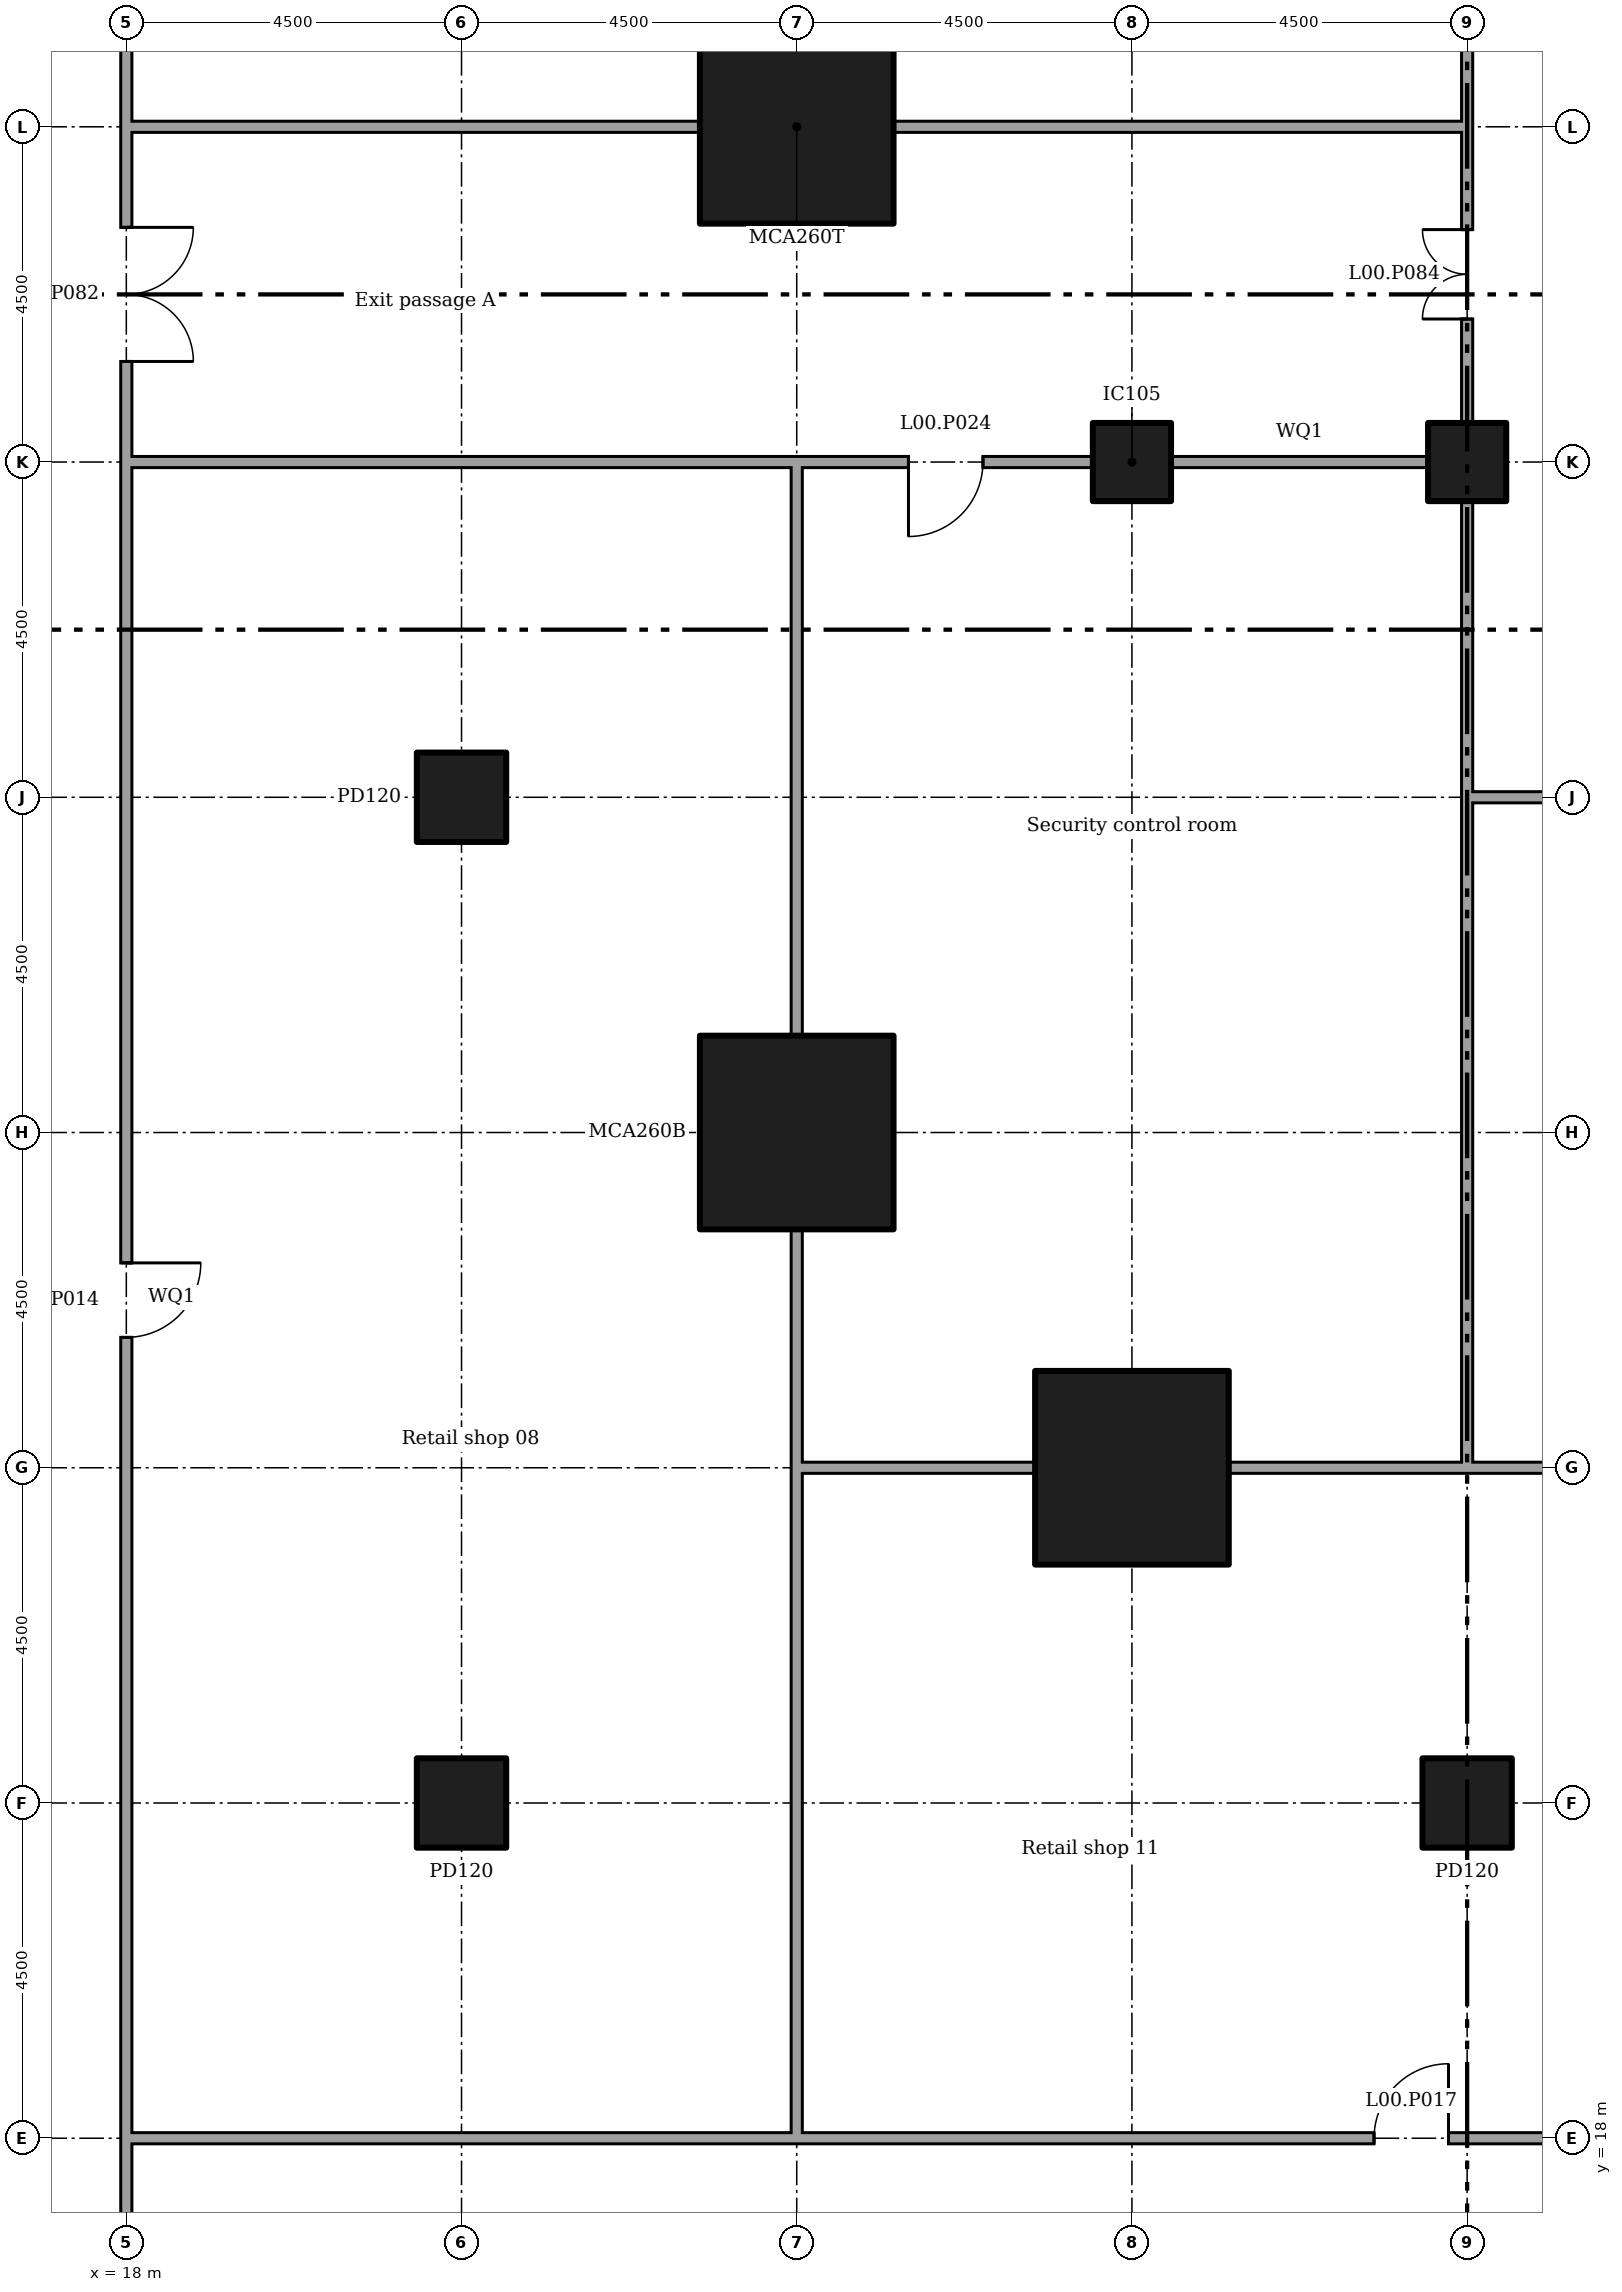
"""IFC4 building model, lengths in metres.
Left out: names, types, materials, properties, quantities, classifications, styles, units other than length and angle.
Written with IfcOpenShell. Run it as: python <this file> out.ifc"""

import sys

from ifc_helpers import new_model, si_unit, direction, frame, frame_2d, origin, origin_2d, place, context, subcontext, project, spatial, rectangle, extrude, element, fill, save


model = new_model("IFC4")
c1 = context("Model", 3, precision=1e-05, world=origin(), true_north=direction((0.0, 1.0)))
c2 = subcontext(c1, "Body", "Model", "MODEL_VIEW")
j1 = project(units=[si_unit("LENGTHUNIT", "METRE"), si_unit("PLANEANGLEUNIT", "RADIAN")], contexts=[c1])
p1 = place(None, origin())
s1 = spatial("IfcSite", under=j1, at=p1, CompositionType="ELEMENT")
p2 = place(p1, origin())
s2 = spatial("IfcBuilding", under=s1, at=p2, CompositionType="ELEMENT")
p3 = place(p2, origin())
s3 = spatial("IfcBuildingStorey", under=s2, at=p3, CompositionType="ELEMENT", Elevation=0.0)
for number, where in (
    (1, (27.0, 31.5, 0.0)),
    (2, (27.0, 45.0, 0.0)),
    (3, (31.5, 27.0, 0.0)),
):
    element("IfcColumn", number, at=place(p3, frame(where)), inside=s3, PredefinedType="COLUMN", context=c2, shape_type="SweptSolid", body=[
        extrude(rectangle(XDim=2.6, YDim=2.6, at=origin_2d()), origin(), (0.0, 0.0, 1.0), 6.0),
    ])
for number, where in (
    (4, (31.5, 40.5, 0.0)),
    (5, (36.0, 40.5, 0.0)),
):
    element("IfcColumn", number, at=place(p3, frame(where)), inside=s3, PredefinedType="COLUMN", context=c2, shape_type="SweptSolid", body=[
        extrude(rectangle(XDim=1.05, YDim=1.05, at=origin_2d()), origin(), (0.0, 0.0, 1.0), 6.0),
    ])
for number, where in (
    (6, (22.5, 22.5, 0.0)),
    (7, (22.5, 36.0, 0.0)),
    (8, (36.0, 22.5, 0.0)),
):
    element("IfcColumn", number, at=place(p3, frame(where)), inside=s3, PredefinedType="COLUMN", context=c2, shape_type="SweptSolid", body=[
        extrude(rectangle(XDim=1.2, YDim=1.2, at=origin_2d()), origin(), (0.0, 0.0, 1.0), 6.0),
    ])
p4 = place(p3, frame((18.0, 9.075, 0.0), z_axis=(0.0, 0.0, 1.0), x_axis=(0.0, 1.0, 0.0)))
e9 = element("IfcWall", 9, at=p4, inside=s3, PredefinedType="PARTITIONING", context=c2, shape_type="SweptSolid", body=[
    extrude(rectangle(XDim=9.0, YDim=0.15, at=frame_2d((4.5, 0.0))), origin(), (0.0, 0.0, 1.0), 5.55),
])
p5 = place(p4, frame((3.525, 0.0, 0.0)))
e10 = element("IfcOpeningElement", 10, at=p5, cuts=e9, PredefinedType="OPENING", context=c2, shape_type="SweptSolid", body=[
    extrude(rectangle(XDim=1.8, YDim=2.1, at=frame_2d((0.9, 1.05))), frame((0.0, 0.085, 0.0), z_axis=(0.0, -1.0, 0.0), x_axis=(1.0, 0.0, 0.0)), (0.0, 0.0, 1.0), 0.17),
])
p6 = place(p3, frame((18.075, 18.0, 0.0)))
e11 = element("IfcWall", 11, at=p6, inside=s3, PredefinedType="PARTITIONING", context=c2, shape_type="SweptSolid", body=[
    extrude(rectangle(XDim=9.0, YDim=0.15, at=frame_2d((4.5, 0.0))), origin(), (0.0, 0.0, 1.0), 5.55),
])
p7 = place(p3, frame((27.0, 18.0, 0.0)))
e12 = element("IfcWall", 12, at=p7, inside=s3, PredefinedType="PARTITIONING", context=c2, shape_type="SweptSolid", body=[
    extrude(rectangle(XDim=16.575, YDim=0.15, at=frame_2d((8.288, 0.0))), origin(), (0.0, 0.0, 1.0), 5.55),
])
p8 = place(p7, frame((7.75, 0.0, 0.0)))
e13 = element("IfcOpeningElement", 13, at=p8, cuts=e12, PredefinedType="OPENING", context=c2, shape_type="SweptSolid", body=[
    extrude(rectangle(XDim=1.0, YDim=2.1, at=frame_2d((0.5, 1.05))), frame((0.0, 0.085, 0.0), z_axis=(0.0, -1.0, 0.0), x_axis=(1.0, 0.0, 0.0)), (0.0, 0.0, 1.0), 0.17),
])
p9 = place(p3, frame((18.0, 18.0, 0.0), z_axis=(0.0, 0.0, 1.0), x_axis=(0.0, 1.0, 0.0)))
e14 = element("IfcWall", 14, at=p9, inside=s3, PredefinedType="PARTITIONING", context=c2, shape_type="SweptSolid", body=[
    extrude(rectangle(XDim=22.575, YDim=0.15, at=frame_2d((11.288, 0.0))), origin(), (0.0, 0.0, 1.0), 5.55),
])
p10 = place(p9, frame((10.75, 0.0, 0.0)))
e15 = element("IfcOpeningElement", 15, at=p10, cuts=e14, PredefinedType="OPENING", context=c2, shape_type="SweptSolid", body=[
    extrude(rectangle(XDim=1.0, YDim=2.1, at=frame_2d((0.5, 1.05))), frame((0.0, 0.085, 0.0), z_axis=(0.0, -1.0, 0.0), x_axis=(1.0, 0.0, 0.0)), (0.0, 0.0, 1.0), 0.17),
])
p11 = place(p3, frame((18.0, 40.5, 0.0), z_axis=(0.0, 0.0, 1.0), x_axis=(0.0, 1.0, 0.0)))
e16 = element("IfcWall", 16, at=p11, inside=s3, PredefinedType="PARTITIONING", context=c2, shape_type="SweptSolid", body=[
    extrude(rectangle(XDim=4.575, YDim=0.15, at=frame_2d((2.288, 0.0))), origin(), (0.0, 0.0, 1.0), 5.55),
])
p12 = place(p11, frame((1.35, 0.0, 0.0)))
e17 = element("IfcOpeningElement", 17, at=p12, cuts=e16, PredefinedType="OPENING", context=c2, shape_type="SweptSolid", body=[
    extrude(rectangle(XDim=1.8, YDim=2.1, at=frame_2d((0.9, 1.05))), frame((0.0, 0.085, 0.0), z_axis=(0.0, -1.0, 0.0), x_axis=(1.0, 0.0, 0.0)), (0.0, 0.0, 1.0), 0.17),
])
p13 = place(p3, frame((18.0, 45.0, 0.0), z_axis=(0.0, 0.0, 1.0), x_axis=(0.0, 1.0, 0.0)))
e18 = element("IfcWall", 18, at=p13, inside=s3, PredefinedType="PARTITIONING", context=c2, shape_type="SweptSolid", body=[
    extrude(rectangle(XDim=18.075, YDim=0.15, at=frame_2d((9.038, 0.0))), origin(), (0.0, 0.0, 1.0), 5.55),
])
p14 = place(p13, frame((8.5, 0.0, 0.0)))
e19 = element("IfcOpeningElement", 19, at=p14, cuts=e18, PredefinedType="OPENING", context=c2, shape_type="SweptSolid", body=[
    extrude(rectangle(XDim=1.0, YDim=2.1, at=frame_2d((0.5, 1.05))), frame((0.0, 0.085, 0.0), z_axis=(0.0, -1.0, 0.0), x_axis=(1.0, 0.0, 0.0)), (0.0, 0.0, 1.0), 0.17),
])
p15 = place(p3, frame((18.075, 40.5, 0.0)))
e20 = element("IfcWall", 20, at=p15, inside=s3, PredefinedType="PARTITIONING", context=c2, shape_type="SweptSolid", body=[
    extrude(rectangle(XDim=9.0, YDim=0.15, at=frame_2d((4.5, 0.0))), origin(), (0.0, 0.0, 1.0), 5.55),
])
p16 = place(p3, frame((27.0, 18.075, 0.0), z_axis=(0.0, 0.0, 1.0), x_axis=(0.0, 1.0, 0.0)))
e21 = element("IfcWall", 21, at=p16, inside=s3, PredefinedType="PARTITIONING", context=c2, shape_type="SweptSolid", body=[
    extrude(rectangle(XDim=9.0, YDim=0.15, at=frame_2d((4.5, 0.0))), origin(), (0.0, 0.0, 1.0), 5.55),
])
p17 = place(p3, frame((27.0, 27.0, 0.0), z_axis=(0.0, 0.0, 1.0), x_axis=(0.0, 1.0, 0.0)))
e22 = element("IfcWall", 22, at=p17, inside=s3, PredefinedType="PARTITIONING", context=c2, shape_type="SweptSolid", body=[
    extrude(rectangle(XDim=3.205, YDim=0.15, at=frame_2d((1.603, 0.0))), origin(), (0.0, 0.0, 1.0), 5.55),
])
p18 = place(p3, frame((27.0, 32.795, 0.0), z_axis=(0.0, 0.0, 1.0), x_axis=(0.0, 1.0, 0.0)))
e23 = element("IfcWall", 23, at=p18, inside=s3, PredefinedType="PARTITIONING", context=c2, shape_type="SweptSolid", body=[
    extrude(rectangle(XDim=7.63, YDim=0.15, at=frame_2d((3.815, 0.0))), origin(), (0.0, 0.0, 1.0), 5.55),
])
p19 = place(p3, frame((18.075, 45.0, 0.0)))
e24 = element("IfcWall", 24, at=p19, inside=s3, PredefinedType="PARTITIONING", context=c2, shape_type="SweptSolid", body=[
    extrude(rectangle(XDim=7.63, YDim=0.15, at=frame_2d((3.815, 0.0))), origin(), (0.0, 0.0, 1.0), 5.55),
])
p20 = place(p3, frame((27.0, 40.5, 0.0)))
e25 = element("IfcWall", 25, at=p20, inside=s3, PredefinedType="PARTITIONING", context=c2, shape_type="SweptSolid", body=[
    extrude(rectangle(XDim=3.98, YDim=0.15, at=frame_2d((1.99, 0.0))), origin(), (0.0, 0.0, 1.0), 5.55),
])
p21 = place(p20, frame((1.5, 0.0, 0.0)))
e26 = element("IfcOpeningElement", 26, at=p21, cuts=e25, PredefinedType="OPENING", context=c2, shape_type="SweptSolid", body=[
    extrude(rectangle(XDim=1.0, YDim=2.1, at=frame_2d((0.5, 1.05))), frame((0.0, 0.085, 0.0), z_axis=(0.0, -1.0, 0.0), x_axis=(1.0, 0.0, 0.0)), (0.0, 0.0, 1.0), 0.17),
])
p22 = place(p3, frame((32.02, 40.5, 0.0)))
e27 = element("IfcWall", 27, at=p22, inside=s3, PredefinedType="PARTITIONING", context=c2, shape_type="SweptSolid", body=[
    extrude(rectangle(XDim=3.46, YDim=0.15, at=frame_2d((1.73, 0.0))), origin(), (0.0, 0.0, 1.0), 5.55),
])
p23 = place(p3, frame((28.295, 45.0, 0.0)))
e28 = element("IfcWall", 28, at=p23, inside=s3, PredefinedType="PARTITIONING", context=c2, shape_type="SweptSolid", body=[
    extrude(rectangle(XDim=7.78, YDim=0.15, at=frame_2d((3.89, 0.0))), origin(), (0.0, 0.0, 1.0), 5.55),
])
p24 = place(p3, frame((36.0, 41.02, 0.0), z_axis=(0.0, 0.0, 1.0), x_axis=(0.0, 1.0, 0.0)))
e29 = element("IfcWall", 29, at=p24, inside=s3, PredefinedType="PARTITIONING", context=c2, shape_type="SweptSolid", body=[
    extrude(rectangle(XDim=3.905, YDim=0.15, at=frame_2d((1.953, 0.0))), origin(), (0.0, 0.0, 1.0), 5.55),
])
p25 = place(p24, frame((1.4, 0.0, 0.0)))
e30 = element("IfcOpeningElement", 30, at=p25, cuts=e29, PredefinedType="OPENING", context=c2, shape_type="SweptSolid", body=[
    extrude(rectangle(XDim=1.2, YDim=2.1, at=frame_2d((0.6, 1.05))), frame((0.0, 0.085, 0.0), z_axis=(0.0, -1.0, 0.0), x_axis=(1.0, 0.0, 0.0)), (0.0, 0.0, 1.0), 0.17),
])
p26 = place(p3, frame((27.075, 27.0, 0.0)))
e31 = element("IfcWall", 31, at=p26, inside=s3, PredefinedType="PARTITIONING", context=c2, shape_type="SweptSolid", body=[
    extrude(rectangle(XDim=3.13, YDim=0.15, at=frame_2d((1.565, 0.0))), origin(), (0.0, 0.0, 1.0), 5.55),
])
p27 = place(p3, frame((32.795, 27.0, 0.0)))
e32 = element("IfcWall", 32, at=p27, inside=s3, PredefinedType="PARTITIONING", context=c2, shape_type="SweptSolid", body=[
    extrude(rectangle(XDim=3.28, YDim=0.15, at=frame_2d((1.64, 0.0))), origin(), (0.0, 0.0, 1.0), 5.55),
])
p28 = place(p3, frame((36.0, 27.0, 0.0)))
e33 = element("IfcWall", 33, at=p28, inside=s3, PredefinedType="PARTITIONING", context=c2, shape_type="SweptSolid", body=[
    extrude(rectangle(XDim=7.425, YDim=0.15, at=frame_2d((3.712, 0.0))), origin(), (0.0, 0.0, 1.0), 5.55),
])
p29 = place(p3, frame((36.0, 27.075, 0.0), z_axis=(0.0, 0.0, 1.0), x_axis=(0.0, 1.0, 0.0)))
e34 = element("IfcWall", 34, at=p29, inside=s3, PredefinedType="PARTITIONING", context=c2, shape_type="SweptSolid", body=[
    extrude(rectangle(XDim=9.0, YDim=0.15, at=frame_2d((4.5, 0.0))), origin(), (0.0, 0.0, 1.0), 5.55),
])
p30 = place(p3, frame((36.0, 36.0, 0.0), z_axis=(0.0, 0.0, 1.0), x_axis=(0.0, 1.0, 0.0)))
e35 = element("IfcWall", 35, at=p30, inside=s3, PredefinedType="PARTITIONING", context=c2, shape_type="SweptSolid", body=[
    extrude(rectangle(XDim=3.98, YDim=0.15, at=frame_2d((1.99, 0.0))), origin(), (0.0, 0.0, 1.0), 5.55),
])
p31 = place(p3, frame((36.0, 45.0, 0.0), z_axis=(0.0, 0.0, 1.0), x_axis=(0.0, 1.0, 0.0)))
e36 = element("IfcWall", 36, at=p31, inside=s3, PredefinedType="PARTITIONING", context=c2, shape_type="SweptSolid", body=[
    extrude(rectangle(XDim=18.0, YDim=0.15, at=frame_2d((9.0, 0.0))), origin(), (0.0, 0.0, 1.0), 5.55),
])
p32 = place(p31, frame((8.5, 0.0, 0.0)))
e37 = element("IfcOpeningElement", 37, at=p32, cuts=e36, PredefinedType="OPENING", context=c2, shape_type="SweptSolid", body=[
    extrude(rectangle(XDim=1.0, YDim=2.1, at=frame_2d((0.5, 1.05))), frame((0.0, 0.085, 0.0), z_axis=(0.0, -1.0, 0.0), x_axis=(1.0, 0.0, 0.0)), (0.0, 0.0, 1.0), 0.17),
])
p33 = place(p3, frame((36.075, 36.0, 0.0)))
e38 = element("IfcWall", 38, at=p33, inside=s3, PredefinedType="PARTITIONING", context=c2, shape_type="SweptSolid", body=[
    extrude(rectangle(XDim=14.425, YDim=0.15, at=frame_2d((7.212, 0.0))), origin(), (0.0, 0.0, 1.0), 5.55),
])
p34 = place(p33, frame((6.675, 0.0, 0.0)))
e39 = element("IfcOpeningElement", 39, at=p34, cuts=e38, PredefinedType="OPENING", context=c2, shape_type="SweptSolid", body=[
    extrude(rectangle(XDim=1.0, YDim=2.1, at=frame_2d((0.5, 1.05))), frame((0.0, 0.085, 0.0), z_axis=(0.0, -1.0, 0.0), x_axis=(1.0, 0.0, 0.0)), (0.0, 0.0, 1.0), 0.17),
])
p35 = place(p10, frame((1.0, 0.0, 0.0), x_axis=(-1.0, 0.0, 0.0)))
e40 = element("IfcDoor", 40, at=p35, inside=s3, OperationType="SINGLE_SWING_RIGHT", PredefinedType="DOOR", context=c2, shape_type="SweptSolid", body=[
    extrude(rectangle(XDim=1.0, YDim=2.1, at=frame_2d((0.5, 1.05))), frame((0.0, 0.025, 0.0), z_axis=(0.0, -1.0, 0.0), x_axis=(1.0, 0.0, 0.0)), (0.0, 0.0, 1.0), 0.05),
])
fill(e15, e40)
p36 = place(p8, origin())
e41 = element("IfcDoor", 41, at=p36, inside=s3, OperationType="SINGLE_SWING_LEFT", PredefinedType="DOOR", context=c2, shape_type="SweptSolid", body=[
    extrude(rectangle(XDim=1.0, YDim=2.1, at=frame_2d((0.5, 1.05))), frame((0.0, 0.025, 0.0), z_axis=(0.0, -1.0, 0.0), x_axis=(1.0, 0.0, 0.0)), (0.0, 0.0, 1.0), 0.05),
])
fill(e13, e41)
p37 = place(p21, frame((1.0, 0.0, 0.0), x_axis=(-1.0, 0.0, 0.0)))
e42 = element("IfcDoor", 42, at=p37, inside=s3, OperationType="SINGLE_SWING_LEFT", PredefinedType="DOOR", context=c2, shape_type="SweptSolid", body=[
    extrude(rectangle(XDim=1.0, YDim=2.1, at=frame_2d((0.5, 1.05))), frame((0.0, 0.025, 0.0), z_axis=(0.0, -1.0, 0.0), x_axis=(1.0, 0.0, 0.0)), (0.0, 0.0, 1.0), 0.05),
])
fill(e26, e42)
p38 = place(p12, frame((1.8, 0.0, 0.0), x_axis=(-1.0, 0.0, 0.0)))
e43 = element("IfcDoor", 43, at=p38, inside=s3, OperationType="DOUBLE_DOOR_SINGLE_SWING", PredefinedType="DOOR", context=c2, shape_type="SweptSolid", body=[
    extrude(rectangle(XDim=1.8, YDim=2.1, at=frame_2d((0.9, 1.05))), frame((0.0, 0.025, 0.0), z_axis=(0.0, -1.0, 0.0), x_axis=(1.0, 0.0, 0.0)), (0.0, 0.0, 1.0), 0.05),
])
fill(e17, e43)
p39 = place(p25, origin())
e44 = element("IfcDoor", 44, at=p39, inside=s3, OperationType="DOUBLE_DOOR_SINGLE_SWING", PredefinedType="DOOR", context=c2, shape_type="SweptSolid", body=[
    extrude(rectangle(XDim=1.2, YDim=2.1, at=frame_2d((0.6, 1.05))), frame((0.0, 0.025, 0.0), z_axis=(0.0, -1.0, 0.0), x_axis=(1.0, 0.0, 0.0)), (0.0, 0.0, 1.0), 0.05),
])
fill(e30, e44)
save(model, sys.argv[1])
